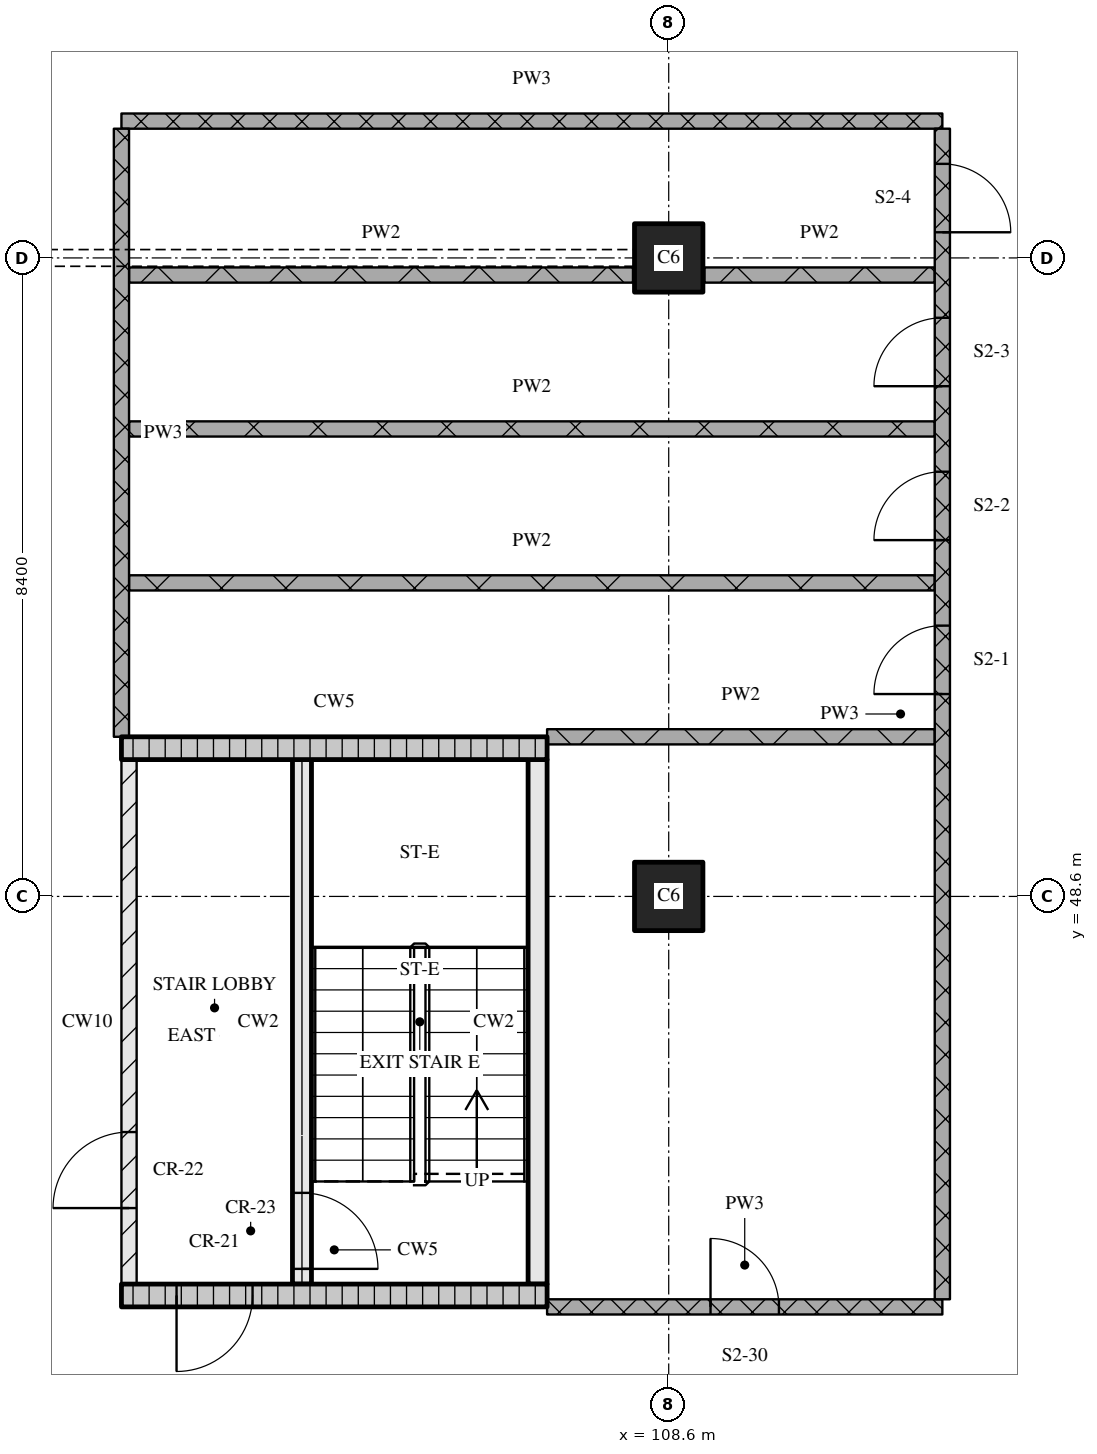
"""IFC4 building model, lengths in metres.
Left out: names, types, materials, properties, quantities, classifications, styles, units other than length and angle.
Written with IfcOpenShell. Run it as: python <this file> out.ifc"""

import sys

from ifc_helpers import new_model, si_unit, direction, frame, frame_2d, origin, origin_2d, place, context, subcontext, project, spatial, rectangle, extrude, element, fill, save


model = new_model("IFC4")
c1 = context("Model", 3, precision=1e-05, world=origin(), true_north=direction((0.0, 1.0)))
c2 = subcontext(c1, "Body", "Model", "MODEL_VIEW")
j1 = project(units=[si_unit("LENGTHUNIT", "METRE"), si_unit("PLANEANGLEUNIT", "RADIAN")], contexts=[c1])
p1 = place(None, origin())
s1 = spatial("IfcSite", under=j1, at=p1, CompositionType="ELEMENT")
p2 = place(p1, origin())
s2 = spatial("IfcBuilding", under=s1, at=p2, CompositionType="ELEMENT")
p3 = place(p2, frame((0.0, 0.0, 28.2)))
s3 = spatial("IfcBuildingStorey", under=s2, at=p3, CompositionType="ELEMENT", Elevation=28.2)
for number, where, z_axis, x_axis in (
    (1, (108.6, 48.6, 0.0), (0.0, 0.0, 1.0), (1.0, 0.0, 0.0)),
    (2, (108.6, 57.0, 0.0), (0.0, 0.0, 1.0), (1.0, 0.0, 0.0)),
):
    element("IfcColumn", number, at=place(p3, frame(where, z_axis=z_axis, x_axis=x_axis)), inside=s3, PredefinedType="COLUMN", context=c2, shape_type="SweptSolid", body=[
        extrude(rectangle(XDim=0.9, YDim=0.9, at=origin_2d()), origin(), (0.0, 0.0, 1.0), 4.5),
    ])
p4 = place(p3, frame((101.4, 43.35, 0.0), z_axis=(0.0, 0.0, 1.0), x_axis=(1.0, 0.0, 0.0)))
e3 = element("IfcWall", 3, at=p4, inside=s3, PredefinedType="SOLIDWALL", context=c2, shape_type="SweptSolid", body=[
    extrude(rectangle(XDim=5.6, YDim=0.3, at=frame_2d((2.8, 0.0))), origin(), (0.0, 0.0, 1.0), 4.2),
])
p5 = place(p4, frame((0.725, 0.0, 0.0)))
e4 = element("IfcOpeningElement", 4, at=p5, cuts=e3, PredefinedType="OPENING", context=c2, shape_type="SweptSolid", body=[
    extrude(rectangle(XDim=1.0, YDim=2.1, at=frame_2d((0.5, 1.05))), frame((0.0, 0.16, 0.0), z_axis=(0.0, -1.0, 0.0), x_axis=(1.0, 0.0, 0.0)), (0.0, 0.0, 1.0), 0.32),
])
p6 = place(p3, frame((101.5, 43.5, 0.0), z_axis=(0.0, 0.0, 1.0), x_axis=(0.0, 1.0, 0.0)))
e5 = element("IfcWall", 5, at=p6, inside=s3, PredefinedType="PARTITIONING", context=c2, shape_type="SweptSolid", body=[
    extrude(rectangle(XDim=6.9, YDim=0.2, at=frame_2d((3.45, 0.0))), origin(), (0.0, 0.0, 1.0), 4.2),
])
p7 = place(p6, frame((1.0, 0.0, 0.0)))
e6 = element("IfcOpeningElement", 6, at=p7, cuts=e5, PredefinedType="OPENING", context=c2, shape_type="SweptSolid", body=[
    extrude(rectangle(XDim=1.0, YDim=2.1, at=frame_2d((0.5, 1.05))), frame((0.0, 0.11, 0.0), z_axis=(0.0, -1.0, 0.0), x_axis=(1.0, 0.0, 0.0)), (0.0, 0.0, 1.0), 0.22),
])
p8 = place(p3, frame((103.775, 43.5, 0.0), z_axis=(0.0, 0.0, 1.0), x_axis=(0.0, 1.0, 0.0)))
e7 = element("IfcWall", 7, at=p8, inside=s3, PredefinedType="SOLIDWALL", context=c2, shape_type="SweptSolid", body=[
    extrude(rectangle(XDim=6.9, YDim=0.25, at=frame_2d((3.45, 0.0))), origin(), (0.0, 0.0, 1.0), 4.2),
])
p9 = place(p8, frame((0.2, 0.0, 0.0)))
e8 = element("IfcOpeningElement", 8, at=p9, cuts=e7, PredefinedType="OPENING", context=c2, shape_type="SweptSolid", body=[
    extrude(rectangle(XDim=1.0, YDim=2.1, at=frame_2d((0.5, 1.05))), frame((0.0, 0.135, 0.0), z_axis=(0.0, -1.0, 0.0), x_axis=(1.0, 0.0, 0.0)), (0.0, 0.0, 1.0), 0.27),
])
p10 = place(p3, frame((106.875, 43.5, 0.0), z_axis=(0.0, 0.0, 1.0), x_axis=(0.0, 1.0, 0.0)))
e9 = element("IfcWall", 9, at=p10, inside=s3, PredefinedType="SOLIDWALL", context=c2, shape_type="SweptSolid", body=[
    extrude(rectangle(XDim=6.9, YDim=0.25, at=frame_2d((3.45, 0.0))), origin(), (0.0, 0.0, 1.0), 4.2),
])
p11 = place(p3, frame((101.4, 50.55, 0.0), z_axis=(0.0, 0.0, 1.0), x_axis=(1.0, 0.0, 0.0)))
e10 = element("IfcWall", 10, at=p11, inside=s3, PredefinedType="SOLIDWALL", context=c2, shape_type="SweptSolid", body=[
    extrude(rectangle(XDim=5.6, YDim=0.3, at=frame_2d((2.8, 0.0))), origin(), (0.0, 0.0, 1.0), 4.2),
])
p12 = place(p3, frame((107.0, 43.2, 0.0), z_axis=(0.0, 0.0, 1.0), x_axis=(1.0, 0.0, 0.0)))
e11 = element("IfcWall", 11, at=p12, inside=s3, PredefinedType="PARTITIONING", context=c2, shape_type="SweptSolid", body=[
    extrude(rectangle(XDim=5.2, YDim=0.2, at=frame_2d((2.6, 0.0))), origin(), (0.0, 0.0, 1.0), 4.2),
])
p13 = place(p12, frame((2.15, 0.0, 0.0)))
e12 = element("IfcOpeningElement", 12, at=p13, cuts=e11, PredefinedType="OPENING", context=c2, shape_type="SweptSolid", body=[
    extrude(rectangle(XDim=0.9, YDim=2.1, at=frame_2d((0.45, 1.05))), frame((0.0, 0.11, 0.0), z_axis=(0.0, -1.0, 0.0), x_axis=(1.0, 0.0, 0.0)), (0.0, 0.0, 1.0), 0.22),
])
p14 = place(p3, frame((107.0, 50.7, 0.0), z_axis=(0.0, 0.0, 1.0), x_axis=(1.0, 0.0, 0.0)))
e13 = element("IfcWall", 13, at=p14, inside=s3, PredefinedType="PARTITIONING", context=c2, shape_type="SweptSolid", body=[
    extrude(rectangle(XDim=5.1, YDim=0.2, at=frame_2d((2.55, 0.0))), origin(), (0.0, 0.0, 1.0), 4.2),
])
for number, where, z_axis, x_axis in (
    (14, (101.5, 52.725, 0.0), (0.0, 0.0, 1.0), (1.0, 0.0, 0.0)),
    (15, (101.5, 54.75, 0.0), (0.0, 0.0, 1.0), (1.0, 0.0, 0.0)),
):
    element("IfcWall", number, at=place(p3, frame(where, z_axis=z_axis, x_axis=x_axis)), inside=s3, PredefinedType="PARTITIONING", context=c2, shape_type="SweptSolid", body=[
        extrude(rectangle(XDim=10.6, YDim=0.2, at=frame_2d((5.3, 0.0))), origin(), (0.0, 0.0, 1.0), 4.2),
    ])
p15 = place(p3, frame((101.5, 56.775, 0.0), z_axis=(0.0, 0.0, 1.0), x_axis=(1.0, 0.0, 0.0)))
e16 = element("IfcWall", 16, at=p15, inside=s3, PredefinedType="PARTITIONING", context=c2, shape_type="SweptSolid", body=[
    extrude(rectangle(XDim=6.63, YDim=0.2, at=frame_2d((3.315, 0.0))), origin(), (0.0, 0.0, 1.0), 4.2),
])
p16 = place(p3, frame((109.07, 56.775, 0.0), z_axis=(0.0, 0.0, 1.0), x_axis=(1.0, 0.0, 0.0)))
e17 = element("IfcWall", 17, at=p16, inside=s3, PredefinedType="PARTITIONING", context=c2, shape_type="SweptSolid", body=[
    extrude(rectangle(XDim=3.03, YDim=0.2, at=frame_2d((1.515, 0.0))), origin(), (0.0, 0.0, 1.0), 4.2),
])
p17 = place(p3, frame((101.4, 58.8, 0.0), z_axis=(0.0, 0.0, 1.0), x_axis=(1.0, 0.0, 0.0)))
e18 = element("IfcWall", 18, at=p17, inside=s3, PredefinedType="PARTITIONING", context=c2, shape_type="SweptSolid", body=[
    extrude(rectangle(XDim=10.8, YDim=0.2, at=frame_2d((5.4, 0.0))), origin(), (0.0, 0.0, 1.0), 4.2),
])
p18 = place(p3, frame((101.4, 58.7, 0.0), z_axis=(0.0, 0.0, 1.0), x_axis=(0.0, -1.0, 0.0)))
e19 = element("IfcWall", 19, at=p18, inside=s3, PredefinedType="PARTITIONING", context=c2, shape_type="SweptSolid", body=[
    extrude(rectangle(XDim=8.0, YDim=0.2, at=frame_2d((4.0, 0.0))), origin(), (0.0, 0.0, 1.0), 4.2),
])
p19 = place(p3, frame((112.2, 43.3, 0.0), z_axis=(0.0, 0.0, 1.0), x_axis=(0.0, 1.0, 0.0)))
e20 = element("IfcWall", 20, at=p19, inside=s3, PredefinedType="PARTITIONING", context=c2, shape_type="SweptSolid", body=[
    extrude(rectangle(XDim=15.4, YDim=0.2, at=frame_2d((7.7, 0.0))), origin(), (0.0, 0.0, 1.0), 4.2),
])
p20 = place(p19, frame((7.962, 0.0, 0.0)))
e21 = element("IfcOpeningElement", 21, at=p20, cuts=e20, PredefinedType="OPENING", context=c2, shape_type="SweptSolid", body=[
    extrude(rectangle(XDim=0.9, YDim=2.1, at=frame_2d((0.45, 1.05))), frame((0.0, 0.11, 0.0), z_axis=(0.0, -1.0, 0.0), x_axis=(1.0, 0.0, 0.0)), (0.0, 0.0, 1.0), 0.22),
])
p21 = place(p19, frame((9.988, 0.0, 0.0)))
e22 = element("IfcOpeningElement", 22, at=p21, cuts=e20, PredefinedType="OPENING", context=c2, shape_type="SweptSolid", body=[
    extrude(rectangle(XDim=0.9, YDim=2.1, at=frame_2d((0.45, 1.05))), frame((0.0, 0.11, 0.0), z_axis=(0.0, -1.0, 0.0), x_axis=(1.0, 0.0, 0.0)), (0.0, 0.0, 1.0), 0.22),
])
p22 = place(p19, frame((12.012, 0.0, 0.0)))
e23 = element("IfcOpeningElement", 23, at=p22, cuts=e20, PredefinedType="OPENING", context=c2, shape_type="SweptSolid", body=[
    extrude(rectangle(XDim=0.9, YDim=2.1, at=frame_2d((0.45, 1.05))), frame((0.0, 0.11, 0.0), z_axis=(0.0, -1.0, 0.0), x_axis=(1.0, 0.0, 0.0)), (0.0, 0.0, 1.0), 0.22),
])
p23 = place(p19, frame((14.038, 0.0, 0.0)))
e24 = element("IfcOpeningElement", 24, at=p23, cuts=e20, PredefinedType="OPENING", context=c2, shape_type="SweptSolid", body=[
    extrude(rectangle(XDim=0.9, YDim=2.1, at=frame_2d((0.45, 1.05))), frame((0.0, 0.11, 0.0), z_axis=(0.0, -1.0, 0.0), x_axis=(1.0, 0.0, 0.0)), (0.0, 0.0, 1.0), 0.22),
])
p24 = place(p5, origin())
e25 = element("IfcDoor", 25, at=p24, inside=s3, OperationType="SINGLE_SWING_RIGHT", PredefinedType="DOOR", context=c2, shape_type="SweptSolid", body=[
    extrude(rectangle(XDim=1.0, YDim=2.1, at=frame_2d((0.5, 1.05))), frame((0.0, 0.025, 0.0), z_axis=(0.0, -1.0, 0.0), x_axis=(1.0, 0.0, 0.0)), (0.0, 0.0, 1.0), 0.05),
])
fill(e4, e25)
p25 = place(p9, origin())
e26 = element("IfcDoor", 26, at=p25, inside=s3, OperationType="SINGLE_SWING_RIGHT", PredefinedType="DOOR", context=c2, shape_type="SweptSolid", body=[
    extrude(rectangle(XDim=1.0, YDim=2.1, at=frame_2d((0.5, 1.05))), frame((0.0, 0.025, 0.0), z_axis=(0.0, -1.0, 0.0), x_axis=(1.0, 0.0, 0.0)), (0.0, 0.0, 1.0), 0.05),
])
fill(e8, e26)
p26 = place(p7, origin())
e27 = element("IfcDoor", 27, at=p26, inside=s3, OperationType="SINGLE_SWING_LEFT", PredefinedType="DOOR", context=c2, shape_type="SweptSolid", body=[
    extrude(rectangle(XDim=1.0, YDim=2.1, at=frame_2d((0.5, 1.05))), frame((0.0, 0.025, 0.0), z_axis=(0.0, -1.0, 0.0), x_axis=(1.0, 0.0, 0.0)), (0.0, 0.0, 1.0), 0.05),
])
fill(e6, e27)
p27 = place(p13, origin())
e28 = element("IfcDoor", 28, at=p27, inside=s3, OperationType="SINGLE_SWING_LEFT", PredefinedType="DOOR", context=c2, shape_type="SweptSolid", body=[
    extrude(rectangle(XDim=0.9, YDim=2.1, at=frame_2d((0.45, 1.05))), frame((0.0, 0.025, 0.0), z_axis=(0.0, -1.0, 0.0), x_axis=(1.0, 0.0, 0.0)), (0.0, 0.0, 1.0), 0.05),
])
fill(e12, e28)
p28 = place(p20, origin())
e29 = element("IfcDoor", 29, at=p28, inside=s3, OperationType="SINGLE_SWING_LEFT", PredefinedType="DOOR", context=c2, shape_type="SweptSolid", body=[
    extrude(rectangle(XDim=0.9, YDim=2.1, at=frame_2d((0.45, 1.05))), frame((0.0, 0.025, 0.0), z_axis=(0.0, -1.0, 0.0), x_axis=(1.0, 0.0, 0.0)), (0.0, 0.0, 1.0), 0.05),
])
fill(e21, e29)
p29 = place(p21, origin())
e30 = element("IfcDoor", 30, at=p29, inside=s3, OperationType="SINGLE_SWING_LEFT", PredefinedType="DOOR", context=c2, shape_type="SweptSolid", body=[
    extrude(rectangle(XDim=0.9, YDim=2.1, at=frame_2d((0.45, 1.05))), frame((0.0, 0.025, 0.0), z_axis=(0.0, -1.0, 0.0), x_axis=(1.0, 0.0, 0.0)), (0.0, 0.0, 1.0), 0.05),
])
fill(e22, e30)
p30 = place(p22, origin())
e31 = element("IfcDoor", 31, at=p30, inside=s3, OperationType="SINGLE_SWING_LEFT", PredefinedType="DOOR", context=c2, shape_type="SweptSolid", body=[
    extrude(rectangle(XDim=0.9, YDim=2.1, at=frame_2d((0.45, 1.05))), frame((0.0, 0.025, 0.0), z_axis=(0.0, -1.0, 0.0), x_axis=(1.0, 0.0, 0.0)), (0.0, 0.0, 1.0), 0.05),
])
fill(e23, e31)
p31 = place(p23, origin())
e32 = element("IfcDoor", 32, at=p31, inside=s3, OperationType="SINGLE_SWING_RIGHT", PredefinedType="DOOR", context=c2, shape_type="SweptSolid", body=[
    extrude(rectangle(XDim=0.9, YDim=2.1, at=frame_2d((0.45, 1.05))), frame((0.0, 0.025, 0.0), z_axis=(0.0, -1.0, 0.0), x_axis=(1.0, 0.0, 0.0)), (0.0, 0.0, 1.0), 0.05),
])
fill(e24, e32)
save(model, sys.argv[1])
